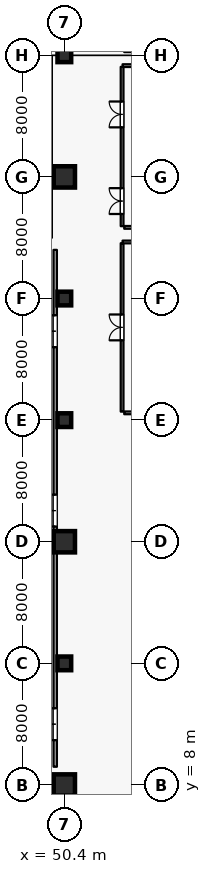
"""IFC4 building model, lengths in metres.
Left out: names, types, materials, properties, quantities, classifications, styles, units other than length and angle.
Written with IfcOpenShell. Run it as: python <this file> out.ifc"""

import sys

from ifc_helpers import new_model, si_unit, direction, frame, frame_2d, origin, origin_2d, place, context, subcontext, project, spatial, rectangle, circle, extrude, element, fill, save


model = new_model("IFC4")
c1 = context("Model", 3, precision=1e-05, world=origin(), true_north=direction((0.0, 1.0)))
c2 = subcontext(c1, "Body", "Model", "MODEL_VIEW")
j1 = project(units=[si_unit("LENGTHUNIT", "METRE"), si_unit("PLANEANGLEUNIT", "RADIAN")], contexts=[c1])
p1 = place(None, origin())
s1 = spatial("IfcSite", under=j1, at=p1, CompositionType="ELEMENT")
p2 = place(p1, origin())
s2 = spatial("IfcBuilding", under=s1, at=p2, CompositionType="ELEMENT")
p3 = place(p2, frame((0.0, 0.0, 6.0)))
s3 = spatial("IfcBuildingStorey", under=s2, at=p3, CompositionType="ELEMENT", Elevation=6.0)
p4 = place(p3, frame((50.4, 8.0, 0.0), z_axis=(0.0, 0.0, 1.0), x_axis=(1.0, 0.0, 0.0)))
e1 = element("IfcColumn", 1, at=p4, inside=s3, PredefinedType="COLUMN", context=c2, shape_type="SweptSolid", body=[
    extrude(circle(Radius=0.7, at=origin_2d()), origin(), (0.0, 0.0, 1.0), 5.4),
])
p5 = place(p3, frame((50.4, 16.0, 0.0), z_axis=(0.0, 0.0, 1.0), x_axis=(1.0, 0.0, 0.0)))
e2 = element("IfcColumn", 2, at=p5, inside=s3, PredefinedType="COLUMN", context=c2, shape_type="SweptSolid", body=[
    extrude(rectangle(XDim=0.9, YDim=0.9, at=origin_2d()), origin(), (0.0, 0.0, 1.0), 5.4),
])
p6 = place(p3, frame((50.4, 24.0, 0.0), z_axis=(0.0, 0.0, 1.0), x_axis=(1.0, 0.0, 0.0)))
e3 = element("IfcColumn", 3, at=p6, inside=s3, PredefinedType="COLUMN", context=c2, shape_type="SweptSolid", body=[
    extrude(circle(Radius=0.7, at=origin_2d()), origin(), (0.0, 0.0, 1.0), 5.4),
])
for number, where, z_axis, x_axis in (
    (4, (50.4, 32.0, 0.0), (0.0, 0.0, 1.0), (1.0, 0.0, 0.0)),
    (5, (50.4, 40.0, 0.0), (0.0, 0.0, 1.0), (1.0, 0.0, 0.0)),
):
    element("IfcColumn", number, at=place(p3, frame(where, z_axis=z_axis, x_axis=x_axis)), inside=s3, PredefinedType="COLUMN", context=c2, shape_type="SweptSolid", body=[
        extrude(rectangle(XDim=0.9, YDim=0.9, at=origin_2d()), origin(), (0.0, 0.0, 1.0), 5.4),
    ])
p7 = place(p3, frame((50.4, 48.0, 0.0), z_axis=(0.0, 0.0, 1.0), x_axis=(1.0, 0.0, 0.0)))
e6 = element("IfcColumn", 6, at=p7, inside=s3, PredefinedType="COLUMN", context=c2, shape_type="SweptSolid", body=[
    extrude(circle(Radius=0.7, at=origin_2d()), origin(), (0.0, 0.0, 1.0), 5.4),
])
p8 = place(p3, frame((50.4, 56.0, 0.0), z_axis=(0.0, 0.0, 1.0), x_axis=(1.0, 0.0, 0.0)))
e7 = element("IfcColumn", 7, at=p8, inside=s3, PredefinedType="COLUMN", context=c2, shape_type="SweptSolid", body=[
    extrude(rectangle(XDim=0.9, YDim=0.9, at=origin_2d()), origin(), (0.0, 0.0, 1.0), 5.4),
])
p9 = place(p3, frame((49.8, 9.2, 0.0), z_axis=(0.0, 0.0, 1.0), x_axis=(0.0, 1.0, 0.0)))
e8 = element("IfcWall", 8, at=p9, inside=s3, PredefinedType="PARTITIONING", context=c2, shape_type="SweptSolid", body=[
    extrude(rectangle(XDim=34.0, YDim=0.22, at=frame_2d((17.0, 0.0))), origin(), (0.0, 0.0, 1.0), 5.045),
])
p10 = place(p9, frame((1.75, 0.0, 0.0)))
e9 = element("IfcOpeningElement", 9, at=p10, cuts=e8, PredefinedType="OPENING", context=c2, shape_type="SweptSolid", body=[
    extrude(rectangle(XDim=2.1, YDim=2.5, at=frame_2d((1.05, 1.25))), frame((0.0, 0.12, 0.0), z_axis=(0.0, -1.0, 0.0), x_axis=(1.0, 0.0, 0.0)), (0.0, 0.0, 1.0), 0.24),
])
p11 = place(p9, frame((15.8, 0.0, 0.0)))
e10 = element("IfcOpeningElement", 10, at=p11, cuts=e8, PredefinedType="OPENING", context=c2, shape_type="SweptSolid", body=[
    extrude(rectangle(XDim=2.1, YDim=2.5, at=frame_2d((1.05, 1.25))), frame((0.0, 0.12, 0.0), z_axis=(0.0, -1.0, 0.0), x_axis=(1.0, 0.0, 0.0)), (0.0, 0.0, 1.0), 0.24),
])
p12 = place(p9, frame((27.6, 0.0, 0.0)))
e11 = element("IfcOpeningElement", 11, at=p12, cuts=e8, PredefinedType="OPENING", context=c2, shape_type="SweptSolid", body=[
    extrude(rectangle(XDim=2.1, YDim=2.5, at=frame_2d((1.05, 1.25))), frame((0.0, 0.12, 0.0), z_axis=(0.0, -1.0, 0.0), x_axis=(1.0, 0.0, 0.0)), (0.0, 0.0, 1.0), 0.24),
])
p13 = place(p3, frame((54.2, 32.56, 0.0), z_axis=(0.0, 0.0, 1.0), x_axis=(0.0, 1.0, 0.0)))
e12 = element("IfcWall", 12, at=p13, inside=s3, PredefinedType="PARTITIONING", context=c2, shape_type="SweptSolid", body=[
    extrude(rectangle(XDim=11.08, YDim=0.18, at=frame_2d((5.54, 0.0))), origin(), (0.0, 0.0, 1.0), 5.045),
])
p14 = place(p13, frame((4.69, 0.0, 0.0)))
e13 = element("IfcOpeningElement", 13, at=p14, cuts=e12, PredefinedType="OPENING", context=c2, shape_type="SweptSolid", body=[
    extrude(rectangle(XDim=1.7, YDim=2.3, at=frame_2d((0.85, 1.15))), frame((0.0, 0.1, 0.0), z_axis=(0.0, -1.0, 0.0), x_axis=(1.0, 0.0, 0.0)), (0.0, 0.0, 1.0), 0.2),
])
p15 = place(p3, frame((54.34, 32.48, 0.0), z_axis=(0.0, 0.0, 1.0), x_axis=(1.0, 0.0, 0.0)))
e14 = element("IfcWall", 14, at=p15, inside=s3, PredefinedType="PARTITIONING", context=c2, shape_type="SweptSolid", body=[
    extrude(rectangle(XDim=11.61, YDim=0.18, at=frame_2d((5.805, 0.0))), origin(), (0.0, 0.0, 1.0), 5.045),
])
p16 = place(p15, frame((5.1, 0.0, 0.0)))
e15 = element("IfcOpeningElement", 15, at=p16, cuts=e14, PredefinedType="OPENING", context=c2, shape_type="SweptSolid", body=[
    extrude(rectangle(XDim=1.7, YDim=2.3, at=frame_2d((0.85, 1.15))), frame((0.0, 0.1, 0.0), z_axis=(0.0, -1.0, 0.0), x_axis=(1.0, 0.0, 0.0)), (0.0, 0.0, 1.0), 0.2),
])
p17 = place(p3, frame((54.2, 44.76, 0.0), z_axis=(0.0, 0.0, 1.0), x_axis=(0.0, 1.0, 0.0)))
e16 = element("IfcWall", 16, at=p17, inside=s3, PredefinedType="PARTITIONING", context=c2, shape_type="SweptSolid", body=[
    extrude(rectangle(XDim=10.48, YDim=0.18, at=frame_2d((5.24, 0.0))), origin(), (0.0, 0.0, 1.0), 5.045),
])
p18 = place(p17, frame((0.8, 0.0, 0.0)))
e17 = element("IfcOpeningElement", 17, at=p18, cuts=e16, PredefinedType="OPENING", context=c2, shape_type="SweptSolid", body=[
    extrude(rectangle(XDim=1.7, YDim=2.3, at=frame_2d((0.85, 1.15))), frame((0.0, 0.1, 0.0), z_axis=(0.0, -1.0, 0.0), x_axis=(1.0, 0.0, 0.0)), (0.0, 0.0, 1.0), 0.2),
])
p19 = place(p17, frame((6.5, 0.0, 0.0)))
e18 = element("IfcOpeningElement", 18, at=p19, cuts=e16, PredefinedType="OPENING", context=c2, shape_type="SweptSolid", body=[
    extrude(rectangle(XDim=1.7, YDim=2.3, at=frame_2d((0.85, 1.15))), frame((0.0, 0.1, 0.0), z_axis=(0.0, -1.0, 0.0), x_axis=(1.0, 0.0, 0.0)), (0.0, 0.0, 1.0), 0.2),
])
p20 = place(p3, frame((54.34, 44.68, 0.0), z_axis=(0.0, 0.0, 1.0), x_axis=(1.0, 0.0, 0.0)))
e19 = element("IfcWall", 19, at=p20, inside=s3, PredefinedType="PARTITIONING", context=c2, shape_type="SweptSolid", body=[
    extrude(rectangle(XDim=11.61, YDim=0.18, at=frame_2d((5.805, 0.0))), origin(), (0.0, 0.0, 1.0), 5.045),
])
p21 = place(p3, frame((54.232, 43.72, 0.0), z_axis=(0.0, 0.0, 1.0), x_axis=(1.0, 0.0, 0.0)))
e20 = element("IfcWall", 20, at=p21, inside=s3, PredefinedType="PARTITIONING", context=c2, shape_type="SweptSolid", body=[
    extrude(rectangle(XDim=11.798, YDim=0.18, at=frame_2d((5.899, 0.0))), origin(), (0.0, 0.0, 1.0), 5.045),
])
p22 = place(p3, frame((54.232, 55.32, 0.0), z_axis=(0.0, 0.0, 1.0), x_axis=(1.0, 0.0, 0.0)))
e21 = element("IfcWall", 21, at=p22, inside=s3, PredefinedType="PARTITIONING", context=c2, shape_type="SweptSolid", body=[
    extrude(rectangle(XDim=4.168, YDim=0.18, at=frame_2d((2.084, 0.0))), origin(), (0.0, 0.0, 1.0), 5.045),
])
p23 = place(p10, origin())
e22 = element("IfcDoor", 22, at=p23, inside=s3, OperationType="DOUBLE_DOOR_SINGLE_SWING", PredefinedType="DOOR", context=c2, shape_type="SweptSolid", body=[
    extrude(rectangle(XDim=2.1, YDim=2.5, at=frame_2d((1.05, 1.25))), frame((0.0, 0.025, 0.0), z_axis=(0.0, -1.0, 0.0), x_axis=(1.0, 0.0, 0.0)), (0.0, 0.0, 1.0), 0.05),
])
fill(e9, e22)
p24 = place(p11, origin())
e23 = element("IfcDoor", 23, at=p24, inside=s3, OperationType="DOUBLE_DOOR_SINGLE_SWING", PredefinedType="DOOR", context=c2, shape_type="SweptSolid", body=[
    extrude(rectangle(XDim=2.1, YDim=2.5, at=frame_2d((1.05, 1.25))), frame((0.0, 0.025, 0.0), z_axis=(0.0, -1.0, 0.0), x_axis=(1.0, 0.0, 0.0)), (0.0, 0.0, 1.0), 0.05),
])
fill(e10, e23)
p25 = place(p12, origin())
e24 = element("IfcDoor", 24, at=p25, inside=s3, OperationType="DOUBLE_DOOR_SINGLE_SWING", PredefinedType="DOOR", context=c2, shape_type="SweptSolid", body=[
    extrude(rectangle(XDim=2.1, YDim=2.5, at=frame_2d((1.05, 1.25))), frame((0.0, 0.025, 0.0), z_axis=(0.0, -1.0, 0.0), x_axis=(1.0, 0.0, 0.0)), (0.0, 0.0, 1.0), 0.05),
])
fill(e11, e24)
p26 = place(p14, origin())
e25 = element("IfcDoor", 25, at=p26, inside=s3, OperationType="DOUBLE_DOOR_SINGLE_SWING", PredefinedType="DOOR", context=c2, shape_type="SweptSolid", body=[
    extrude(rectangle(XDim=1.7, YDim=2.3, at=frame_2d((0.85, 1.15))), frame((0.0, 0.025, 0.0), z_axis=(0.0, -1.0, 0.0), x_axis=(1.0, 0.0, 0.0)), (0.0, 0.0, 1.0), 0.05),
])
fill(e13, e25)
p27 = place(p18, origin())
e26 = element("IfcDoor", 26, at=p27, inside=s3, OperationType="DOUBLE_DOOR_SINGLE_SWING", PredefinedType="DOOR", context=c2, shape_type="SweptSolid", body=[
    extrude(rectangle(XDim=1.7, YDim=2.3, at=frame_2d((0.85, 1.15))), frame((0.0, 0.025, 0.0), z_axis=(0.0, -1.0, 0.0), x_axis=(1.0, 0.0, 0.0)), (0.0, 0.0, 1.0), 0.05),
])
fill(e17, e26)
p28 = place(p19, origin())
e27 = element("IfcDoor", 27, at=p28, inside=s3, OperationType="DOUBLE_DOOR_SINGLE_SWING", PredefinedType="DOOR", context=c2, shape_type="SweptSolid", body=[
    extrude(rectangle(XDim=1.7, YDim=2.3, at=frame_2d((0.85, 1.15))), frame((0.0, 0.025, 0.0), z_axis=(0.0, -1.0, 0.0), x_axis=(1.0, 0.0, 0.0)), (0.0, 0.0, 1.0), 0.05),
])
fill(e18, e27)
save(model, sys.argv[1])
